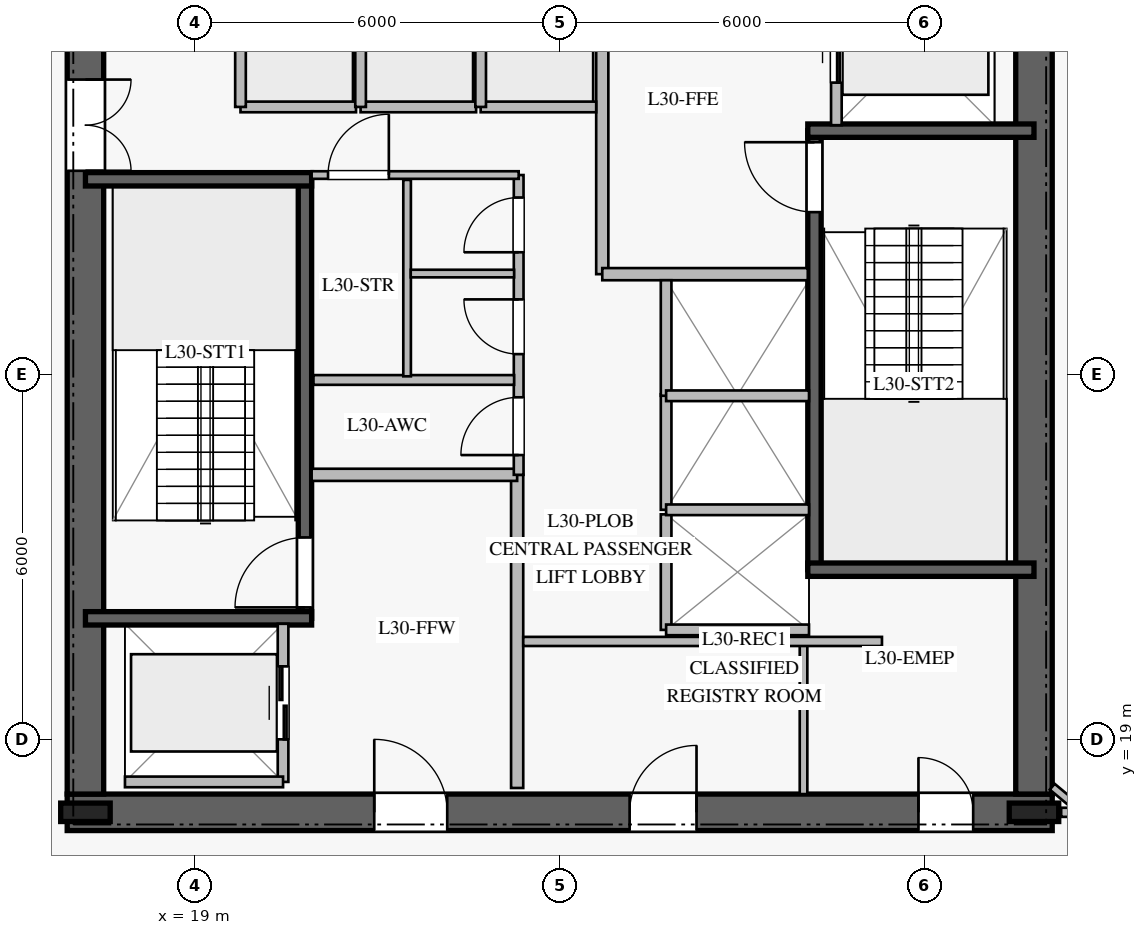
"""IFC4 building model, lengths in metres.
Left out: names, types, materials, properties, quantities, classifications, styles, units other than length and angle.
Written with IfcOpenShell. Run it as: python <this file> out.ifc"""

import sys

from ifc_helpers import new_model, si_unit, direction, frame, frame_2d, origin, origin_2d, place, context, subcontext, project, spatial, rectangle, i_section, extrude, element, fill, save


model = new_model("IFC4")
c1 = context("Model", 3, precision=1e-05, world=origin(), true_north=direction((0.0, 1.0)))
c2 = subcontext(c1, "Body", "Model", "MODEL_VIEW")
j1 = project(units=[si_unit("LENGTHUNIT", "METRE"), si_unit("PLANEANGLEUNIT", "RADIAN")], contexts=[c1])
p1 = place(None, origin())
s1 = spatial("IfcSite", under=j1, at=p1, CompositionType="ELEMENT")
p2 = place(p1, origin())
s2 = spatial("IfcBuilding", under=s1, at=p2, CompositionType="ELEMENT")
p3 = place(p2, frame((0.0, 0.0, 126.4)))
s3 = spatial("IfcBuildingStorey", under=s2, at=p3, CompositionType="ELEMENT", Elevation=126.4)
p4 = place(p3, frame((16.9, 17.8, 0.0), z_axis=(0.0, 0.0, 1.0), x_axis=(1.0, 0.0, 0.0)))
e1 = element("IfcWall", 1, at=p4, inside=s3, PredefinedType="SHEAR", context=c2, shape_type="SweptSolid", body=[
    extrude(rectangle(XDim=16.2, YDim=0.6, at=frame_2d((8.1, 0.0))), origin(), (0.0, 0.0, 1.0), 3.76),
])
p5 = place(p4, frame((5.05, 0.0, 0.0)))
e2 = element("IfcOpeningElement", 2, at=p5, cuts=e1, PredefinedType="OPENING", context=c2, shape_type="SweptSolid", body=[
    extrude(rectangle(XDim=1.2, YDim=2.25, at=frame_2d((0.6, 1.125))), frame((0.0, 0.31, 0.0), z_axis=(0.0, -1.0, 0.0), x_axis=(1.0, 0.0, 0.0)), (0.0, 0.0, 1.0), 0.62),
])
p6 = place(p4, frame((14.0, 0.0, 0.0)))
e3 = element("IfcOpeningElement", 3, at=p6, cuts=e1, PredefinedType="OPENING", context=c2, shape_type="SweptSolid", body=[
    extrude(rectangle(XDim=0.9, YDim=2.1, at=frame_2d((0.45, 1.05))), frame((0.0, 0.31, 0.0), z_axis=(0.0, -1.0, 0.0), x_axis=(1.0, 0.0, 0.0)), (0.0, 0.0, 1.0), 0.62),
])
p7 = place(p4, frame((9.25, 0.0, 0.0)))
e4 = element("IfcOpeningElement", 4, at=p7, cuts=e1, PredefinedType="OPENING", context=c2, shape_type="SweptSolid", body=[
    extrude(rectangle(XDim=1.1, YDim=2.2, at=frame_2d((0.55, 1.1))), frame((0.0, 0.31, 0.0), z_axis=(0.0, -1.0, 0.0), x_axis=(1.0, 0.0, 0.0)), (0.0, 0.0, 1.0), 0.62),
])
p8 = place(p3, frame((17.2, 31.9, 0.0), z_axis=(0.0, 0.0, 1.0), x_axis=(0.0, -1.0, 0.0)))
e5 = element("IfcWall", 5, at=p8, inside=s3, PredefinedType="SHEAR", context=c2, shape_type="SweptSolid", body=[
    extrude(rectangle(XDim=13.8, YDim=0.6, at=frame_2d((6.9, 0.0))), origin(), (0.0, 0.0, 1.0), 3.76),
])
p9 = place(p8, frame((2.05, 0.0, 0.0)))
e6 = element("IfcOpeningElement", 6, at=p9, cuts=e5, PredefinedType="OPENING", context=c2, shape_type="SweptSolid", body=[
    extrude(rectangle(XDim=1.5, YDim=2.2, at=frame_2d((0.75, 1.1))), frame((0.0, 0.31, 0.0), z_axis=(0.0, -1.0, 0.0), x_axis=(1.0, 0.0, 0.0)), (0.0, 0.0, 1.0), 0.62),
])
p10 = place(p3, frame((32.8, 18.1, 0.0), z_axis=(0.0, 0.0, 1.0), x_axis=(0.0, 1.0, 0.0)))
e7 = element("IfcWall", 7, at=p10, inside=s3, PredefinedType="SHEAR", context=c2, shape_type="SweptSolid", body=[
    extrude(rectangle(XDim=13.8, YDim=0.6, at=frame_2d((6.9, 0.0))), origin(), (0.0, 0.0, 1.0), 3.76),
])
for number, where, z_axis, x_axis in (
    (8, (17.2, 17.8, 0.0), (0.0, 0.0, 1.0), (1.0, 0.0, 0.0)),
    (9, (32.8, 17.8, 0.0), (0.0, 0.0, 1.0), (1.0, 0.0, 0.0)),
):
    element("IfcColumn", number, at=place(p3, frame(where, z_axis=z_axis, x_axis=x_axis)), inside=s3, PredefinedType="COLUMN", context=c2, shape_type="SweptSolid", body=[
        extrude(i_section(OverallWidth=0.303, OverallDepth=0.814, WebThickness=0.021, FlangeThickness=0.04, at=origin_2d()), origin(), (0.0, 0.0, 1.0), 4.0),
    ])
p11 = place(p3, frame((20.81, 20.99, 0.0), z_axis=(0.0, 0.0, 1.0), x_axis=(0.0, 1.0, 0.0)))
e10 = element("IfcWall", 10, at=p11, inside=s3, PredefinedType="SOLIDWALL", context=c2, shape_type="SweptSolid", body=[
    extrude(rectangle(XDim=7.22, YDim=0.22, at=frame_2d((3.61, 0.0))), origin(), (0.0, 0.0, 1.0), 3.76),
])
p12 = place(p11, frame((0.18, 0.0, 0.0)))
e11 = element("IfcOpeningElement", 11, at=p12, cuts=e10, PredefinedType="OPENING", context=c2, shape_type="SweptSolid", body=[
    extrude(rectangle(XDim=1.15, YDim=2.2, at=frame_2d((0.575, 1.1))), frame((0.0, 0.12, 0.0), z_axis=(0.0, -1.0, 0.0), x_axis=(1.0, 0.0, 0.0)), (0.0, 0.0, 1.0), 0.24),
])
for number, where, z_axis, x_axis in (
    (12, (17.2, 20.99, 0.0), (0.0, 0.0, 1.0), (1.0, 0.0, 0.0)),
    (13, (17.2, 28.21, 0.0), (0.0, 0.0, 1.0), (1.0, 0.0, 0.0)),
):
    element("IfcWall", number, at=place(p3, frame(where, z_axis=z_axis, x_axis=x_axis)), inside=s3, PredefinedType="SOLIDWALL", context=c2, shape_type="SweptSolid", body=[
        extrude(rectangle(XDim=3.72, YDim=0.22, at=frame_2d((1.86, 0.0))), origin(), (0.0, 0.0, 1.0), 3.76),
    ])
p13 = place(p3, frame((29.19, 21.79, 0.0), z_axis=(0.0, 0.0, 1.0), x_axis=(0.0, 1.0, 0.0)))
e14 = element("IfcWall", 14, at=p13, inside=s3, PredefinedType="SOLIDWALL", context=c2, shape_type="SweptSolid", body=[
    extrude(rectangle(XDim=7.22, YDim=0.22, at=frame_2d((3.61, 0.0))), origin(), (0.0, 0.0, 1.0), 3.76),
])
p14 = place(p13, frame((5.88, 0.0, 0.0)))
e15 = element("IfcOpeningElement", 15, at=p14, cuts=e14, PredefinedType="OPENING", context=c2, shape_type="SweptSolid", body=[
    extrude(rectangle(XDim=1.15, YDim=2.2, at=frame_2d((0.575, 1.1))), frame((0.0, 0.12, 0.0), z_axis=(0.0, -1.0, 0.0), x_axis=(1.0, 0.0, 0.0)), (0.0, 0.0, 1.0), 0.24),
])
for number, where, z_axis, x_axis in (
    (16, (29.08, 21.79, 0.0), (0.0, 0.0, 1.0), (1.0, 0.0, 0.0)),
    (17, (29.08, 29.01, 0.0), (0.0, 0.0, 1.0), (1.0, 0.0, 0.0)),
):
    element("IfcWall", number, at=place(p3, frame(where, z_axis=z_axis, x_axis=x_axis)), inside=s3, PredefinedType="SOLIDWALL", context=c2, shape_type="SweptSolid", body=[
        extrude(rectangle(XDim=3.72, YDim=0.22, at=frame_2d((1.86, 0.0))), origin(), (0.0, 0.0, 1.0), 3.76),
    ])
p15 = place(p3, frame((24.3, 18.2, 0.0), z_axis=(0.0, 0.0, 1.0), x_axis=(0.0, 1.0, 0.0)))
e18 = element("IfcWall", 18, at=p15, inside=s3, PredefinedType="PARTITIONING", context=c2, shape_type="SweptSolid", body=[
    extrude(rectangle(XDim=5.15, YDim=0.2, at=frame_2d((2.575, 0.0))), origin(), (0.0, 0.0, 1.0), 3.76),
])
p16 = place(p3, frame((20.92, 23.35, 0.0), z_axis=(0.0, 0.0, 1.0), x_axis=(1.0, 0.0, 0.0)))
e19 = element("IfcWall", 19, at=p16, inside=s3, PredefinedType="PARTITIONING", context=c2, shape_type="SweptSolid", body=[
    extrude(rectangle(XDim=3.38, YDim=0.2, at=frame_2d((1.69, 0.0))), origin(), (0.0, 0.0, 1.0), 3.76),
])
p17 = place(p3, frame((25.7, 26.65, 0.0), z_axis=(0.0, 0.0, 1.0), x_axis=(0.0, 1.0, 0.0)))
e20 = element("IfcWall", 20, at=p17, inside=s3, PredefinedType="PARTITIONING", context=c2, shape_type="SweptSolid", body=[
    extrude(rectangle(XDim=5.15, YDim=0.2, at=frame_2d((2.575, 0.0))), origin(), (0.0, 0.0, 1.0), 3.76),
])
p18 = place(p3, frame((25.7, 26.65, 0.0), z_axis=(0.0, 0.0, 1.0), x_axis=(1.0, 0.0, 0.0)))
e21 = element("IfcWall", 21, at=p18, inside=s3, PredefinedType="PARTITIONING", context=c2, shape_type="SweptSolid", body=[
    extrude(rectangle(XDim=3.38, YDim=0.2, at=frame_2d((1.69, 0.0))), origin(), (0.0, 0.0, 1.0), 3.76),
])
p19 = place(p3, frame((24.325, 23.35, 0.0), z_axis=(0.0, 0.0, 1.0), x_axis=(0.0, 1.0, 0.0)))
e22 = element("IfcWall", 22, at=p19, inside=s3, PredefinedType="PLUMBINGWALL", context=c2, shape_type="SweptSolid", body=[
    extrude(rectangle(XDim=4.93, YDim=0.16, at=frame_2d((2.465, 0.0))), origin(), (0.0, 0.0, 1.0), 3.76),
])
p20 = place(p19, frame((0.325, 0.0, 0.0)))
e23 = element("IfcOpeningElement", 23, at=p20, cuts=e22, PredefinedType="OPENING", context=c2, shape_type="SweptSolid", body=[
    extrude(rectangle(XDim=0.95, YDim=2.1, at=frame_2d((0.475, 1.05))), frame((0.0, 0.09, 0.0), z_axis=(0.0, -1.0, 0.0), x_axis=(1.0, 0.0, 0.0)), (0.0, 0.0, 1.0), 0.18),
])
p21 = place(p19, frame((1.985, 0.0, 0.0)))
e24 = element("IfcOpeningElement", 24, at=p21, cuts=e22, PredefinedType="OPENING", context=c2, shape_type="SweptSolid", body=[
    extrude(rectangle(XDim=0.9, YDim=2.1, at=frame_2d((0.45, 1.05))), frame((0.0, 0.09, 0.0), z_axis=(0.0, -1.0, 0.0), x_axis=(1.0, 0.0, 0.0)), (0.0, 0.0, 1.0), 0.18),
])
p22 = place(p19, frame((3.66, 0.0, 0.0)))
e25 = element("IfcOpeningElement", 25, at=p22, cuts=e22, PredefinedType="OPENING", context=c2, shape_type="SweptSolid", body=[
    extrude(rectangle(XDim=0.9, YDim=2.1, at=frame_2d((0.45, 1.05))), frame((0.0, 0.09, 0.0), z_axis=(0.0, -1.0, 0.0), x_axis=(1.0, 0.0, 0.0)), (0.0, 0.0, 1.0), 0.18),
])
p23 = place(p3, frame((20.92, 28.28, 0.0), z_axis=(0.0, 0.0, 1.0), x_axis=(1.0, 0.0, 0.0)))
e26 = element("IfcWall", 26, at=p23, inside=s3, PredefinedType="PARTITIONING", context=c2, shape_type="SweptSolid", body=[
    extrude(rectangle(XDim=3.405, YDim=0.125, at=frame_2d((1.703, 0.0))), origin(), (0.0, 0.0, 1.0), 3.76),
])
p24 = place(p23, frame((0.27, 0.0, 0.0)))
e27 = element("IfcOpeningElement", 27, at=p24, cuts=e26, PredefinedType="OPENING", context=c2, shape_type="SweptSolid", body=[
    extrude(rectangle(XDim=1.0, YDim=2.15, at=frame_2d((0.5, 1.075))), frame((0.0, 0.073, 0.0), z_axis=(0.0, -1.0, 0.0), x_axis=(1.0, 0.0, 0.0)), (0.0, 0.0, 1.0), 0.145),
])
p25 = place(p3, frame((29.01, 18.1, 0.0), z_axis=(0.0, 0.0, 1.0), x_axis=(0.0, 1.0, 0.0)))
e28 = element("IfcWall", 28, at=p25, inside=s3, PredefinedType="PARTITIONING", context=c2, shape_type="SweptSolid", body=[
    extrude(rectangle(XDim=2.45, YDim=0.125, at=frame_2d((1.225, 0.0))), origin(), (0.0, 0.0, 1.0), 3.76),
])
p26 = place(p3, frame((20.95, 24.91, 0.0), z_axis=(0.0, 0.0, 1.0), x_axis=(1.0, 0.0, 0.0)))
e29 = element("IfcWall", 29, at=p26, inside=s3, PredefinedType="PLUMBINGWALL", context=c2, shape_type="SweptSolid", body=[
    extrude(rectangle(XDim=3.3, YDim=0.16, at=frame_2d((1.65, 0.0))), origin(), (0.0, 0.0, 1.0), 3.76),
])
p27 = place(p3, frame((22.49, 24.97, 0.0), z_axis=(0.0, 0.0, 1.0), x_axis=(0.0, 1.0, 0.0)))
e30 = element("IfcWall", 30, at=p27, inside=s3, PredefinedType="PARTITIONING", context=c2, shape_type="SweptSolid", body=[
    extrude(rectangle(XDim=3.23, YDim=0.125, at=frame_2d((1.615, 0.0))), origin(), (0.0, 0.0, 1.0), 3.76),
])
p28 = place(p3, frame((22.55, 26.66, 0.0), z_axis=(0.0, 0.0, 1.0), x_axis=(1.0, 0.0, 0.0)))
e31 = element("IfcWall", 31, at=p28, inside=s3, PredefinedType="PARTITIONING", context=c2, shape_type="SweptSolid", body=[
    extrude(rectangle(XDim=1.7, YDim=0.125, at=frame_2d((0.85, 0.0))), origin(), (0.0, 0.0, 1.0), 3.76),
])
p29 = place(p3, frame((24.4, 20.61, 0.0), z_axis=(0.0, 0.0, 1.0), x_axis=(1.0, 0.0, 0.0)))
e32 = element("IfcWall", 32, at=p29, inside=s3, PredefinedType="PARTITIONING", context=c2, shape_type="SweptSolid", body=[
    extrude(rectangle(XDim=5.9, YDim=0.15, at=frame_2d((2.95, 0.0))), origin(), (0.0, 0.0, 1.0), 3.76),
])
p30 = place(p3, frame((19.75, 29.4, 0.0), z_axis=(0.0, 0.0, 1.0), x_axis=(1.0, 0.0, 0.0)))
e33 = element("IfcWall", 33, at=p30, inside=s3, PredefinedType="PARTITIONING", context=c2, shape_type="SweptSolid", body=[
    extrude(rectangle(XDim=1.9, YDim=0.175, at=frame_2d((0.95, 0.0))), origin(), (0.0, 0.0, 1.0), 3.76),
])
p31 = place(p3, frame((19.75, 29.4, 0.0), z_axis=(0.0, 0.0, 1.0), x_axis=(0.0, 1.0, 0.0)))
e34 = element("IfcWall", 34, at=p31, inside=s3, PredefinedType="PARTITIONING", context=c2, shape_type="SweptSolid", body=[
    extrude(rectangle(XDim=2.35, YDim=0.175, at=frame_2d((1.175, 0.0))), origin(), (0.0, 0.0, 1.0), 3.76),
])
p32 = place(p3, frame((21.725, 29.4, 0.0), z_axis=(0.0, 0.0, 1.0), x_axis=(1.0, 0.0, 0.0)))
e35 = element("IfcWall", 35, at=p32, inside=s3, PredefinedType="PARTITIONING", context=c2, shape_type="SweptSolid", body=[
    extrude(rectangle(XDim=1.9, YDim=0.175, at=frame_2d((0.95, 0.0))), origin(), (0.0, 0.0, 1.0), 3.76),
])
p33 = place(p3, frame((21.725, 29.4, 0.0), z_axis=(0.0, 0.0, 1.0), x_axis=(0.0, 1.0, 0.0)))
e36 = element("IfcWall", 36, at=p33, inside=s3, PredefinedType="PARTITIONING", context=c2, shape_type="SweptSolid", body=[
    extrude(rectangle(XDim=2.35, YDim=0.175, at=frame_2d((1.175, 0.0))), origin(), (0.0, 0.0, 1.0), 3.76),
])
p34 = place(p3, frame((23.7, 29.4, 0.0), z_axis=(0.0, 0.0, 1.0), x_axis=(1.0, 0.0, 0.0)))
e37 = element("IfcWall", 37, at=p34, inside=s3, PredefinedType="PARTITIONING", context=c2, shape_type="SweptSolid", body=[
    extrude(rectangle(XDim=1.9, YDim=0.175, at=frame_2d((0.95, 0.0))), origin(), (0.0, 0.0, 1.0), 3.76),
])
p35 = place(p3, frame((23.7, 29.4, 0.0), z_axis=(0.0, 0.0, 1.0), x_axis=(0.0, 1.0, 0.0)))
e38 = element("IfcWall", 38, at=p35, inside=s3, PredefinedType="PARTITIONING", context=c2, shape_type="SweptSolid", body=[
    extrude(rectangle(XDim=2.35, YDim=0.175, at=frame_2d((1.175, 0.0))), origin(), (0.0, 0.0, 1.0), 3.76),
])
p36 = place(p3, frame((26.75, 20.8, 0.0), z_axis=(0.0, 0.0, 1.0), x_axis=(0.0, 1.0, 0.0)))
e39 = element("IfcWall", 39, at=p36, inside=s3, PredefinedType="PARTITIONING", context=c2, shape_type="SweptSolid", body=[
    extrude(rectangle(XDim=1.9, YDim=0.175, at=frame_2d((0.95, 0.0))), origin(), (0.0, 0.0, 1.0), 3.76),
])
p37 = place(p3, frame((26.75, 20.8, 0.0), z_axis=(0.0, 0.0, 1.0), x_axis=(1.0, 0.0, 0.0)))
e40 = element("IfcWall", 40, at=p37, inside=s3, PredefinedType="PARTITIONING", context=c2, shape_type="SweptSolid", body=[
    extrude(rectangle(XDim=2.35, YDim=0.175, at=frame_2d((1.175, 0.0))), origin(), (0.0, 0.0, 1.0), 3.76),
])
p38 = place(p3, frame((26.75, 22.775, 0.0), z_axis=(0.0, 0.0, 1.0), x_axis=(0.0, 1.0, 0.0)))
e41 = element("IfcWall", 41, at=p38, inside=s3, PredefinedType="PARTITIONING", context=c2, shape_type="SweptSolid", body=[
    extrude(rectangle(XDim=1.9, YDim=0.175, at=frame_2d((0.95, 0.0))), origin(), (0.0, 0.0, 1.0), 3.76),
])
p39 = place(p3, frame((26.75, 22.775, 0.0), z_axis=(0.0, 0.0, 1.0), x_axis=(1.0, 0.0, 0.0)))
e42 = element("IfcWall", 42, at=p39, inside=s3, PredefinedType="PARTITIONING", context=c2, shape_type="SweptSolid", body=[
    extrude(rectangle(XDim=2.35, YDim=0.175, at=frame_2d((1.175, 0.0))), origin(), (0.0, 0.0, 1.0), 3.76),
])
p40 = place(p3, frame((26.75, 24.65, 0.0), z_axis=(0.0, 0.0, 1.0), x_axis=(0.0, 1.0, 0.0)))
e43 = element("IfcWall", 43, at=p40, inside=s3, PredefinedType="PARTITIONING", context=c2, shape_type="SweptSolid", body=[
    extrude(rectangle(XDim=1.9, YDim=0.175, at=frame_2d((0.95, 0.0))), origin(), (0.0, 0.0, 1.0), 3.76),
])
p41 = place(p3, frame((26.75, 24.65, 0.0), z_axis=(0.0, 0.0, 1.0), x_axis=(1.0, 0.0, 0.0)))
e44 = element("IfcWall", 44, at=p41, inside=s3, PredefinedType="PARTITIONING", context=c2, shape_type="SweptSolid", body=[
    extrude(rectangle(XDim=2.35, YDim=0.175, at=frame_2d((1.175, 0.0))), origin(), (0.0, 0.0, 1.0), 3.76),
])
p42 = place(p3, frame((20.45, 18.3, 0.0), z_axis=(0.0, 0.0, 1.0), x_axis=(0.0, 1.0, 0.0)))
e45 = element("IfcWall", 45, at=p42, inside=s3, PredefinedType="PARTITIONING", context=c2, shape_type="SweptSolid", body=[
    extrude(rectangle(XDim=2.6, YDim=0.175, at=frame_2d((1.3, 0.0))), origin(), (0.0, 0.0, 1.0), 3.76),
])
p43 = place(p42, frame((0.7, 0.0, 0.0)))
e46 = element("IfcOpeningElement", 46, at=p43, cuts=e45, PredefinedType="OPENING", context=c2, shape_type="SweptSolid", body=[
    extrude(rectangle(XDim=1.2, YDim=2.2, at=frame_2d((0.6, 1.1))), frame((0.0, 0.098, 0.0), z_axis=(0.0, -1.0, 0.0), x_axis=(1.0, 0.0, 0.0)), (0.0, 0.0, 1.0), 0.195),
])
p44 = place(p3, frame((17.85, 18.3, 0.0), z_axis=(0.0, 0.0, 1.0), x_axis=(1.0, 0.0, 0.0)))
e47 = element("IfcWall", 47, at=p44, inside=s3, PredefinedType="PARTITIONING", context=c2, shape_type="SweptSolid", body=[
    extrude(rectangle(XDim=2.6, YDim=0.175, at=frame_2d((1.3, 0.0))), origin(), (0.0, 0.0, 1.0), 3.76),
])
p45 = place(p3, frame((29.55, 29.1, 0.0), z_axis=(0.0, 0.0, 1.0), x_axis=(0.0, 1.0, 0.0)))
e48 = element("IfcWall", 48, at=p45, inside=s3, PredefinedType="PARTITIONING", context=c2, shape_type="SweptSolid", body=[
    extrude(rectangle(XDim=2.6, YDim=0.175, at=frame_2d((1.3, 0.0))), origin(), (0.0, 0.0, 1.0), 3.76),
])
p46 = place(p45, frame((0.7, 0.0, 0.0)))
e49 = element("IfcOpeningElement", 49, at=p46, cuts=e48, PredefinedType="OPENING", context=c2, shape_type="SweptSolid", body=[
    extrude(rectangle(XDim=1.2, YDim=2.2, at=frame_2d((0.6, 1.1))), frame((0.0, 0.098, 0.0), z_axis=(0.0, -1.0, 0.0), x_axis=(1.0, 0.0, 0.0)), (0.0, 0.0, 1.0), 0.195),
])
p47 = place(p3, frame((33.247, 17.8, 0.0), z_axis=(0.0, 0.0, 1.0), x_axis=(1.0, 0.0, 0.0)))
e50 = element("IfcWall", 50, at=p47, inside=s3, PredefinedType="PARTITIONING", context=c2, shape_type="SweptSolid", body=[
    extrude(rectangle(XDim=7.953, YDim=0.15, at=frame_2d((3.977, 0.0))), origin(), (0.0, 0.0, 1.0), 3.21),
])
p48 = place(p3, frame((33.1, 18.221, 0.0), z_axis=(0.0, 0.0, 1.0), x_axis=(0.76748927859, -0.641061781148, 0.0)))
e51 = element("IfcWall", 51, at=p48, inside=s3, PredefinedType="PARTITIONING", context=c2, shape_type="SweptSolid", body=[
    extrude(rectangle(XDim=0.656, YDim=0.125, at=frame_2d((0.328, 0.0))), origin(), (0.0, 0.0, 1.0), 3.21),
])
p49 = place(p12, origin())
e52 = element("IfcDoor", 52, at=p49, inside=s3, OperationType="SINGLE_SWING_LEFT", PredefinedType="DOOR", context=c2, shape_type="SweptSolid", body=[
    extrude(rectangle(XDim=1.15, YDim=2.2, at=frame_2d((0.575, 1.1))), frame((0.0, 0.025, 0.0), z_axis=(0.0, -1.0, 0.0), x_axis=(1.0, 0.0, 0.0)), (0.0, 0.0, 1.0), 0.05),
])
fill(e11, e52)
p50 = place(p14, origin())
e53 = element("IfcDoor", 53, at=p50, inside=s3, OperationType="SINGLE_SWING_RIGHT", PredefinedType="DOOR", context=c2, shape_type="SweptSolid", body=[
    extrude(rectangle(XDim=1.15, YDim=2.2, at=frame_2d((0.575, 1.1))), frame((0.0, 0.025, 0.0), z_axis=(0.0, -1.0, 0.0), x_axis=(1.0, 0.0, 0.0)), (0.0, 0.0, 1.0), 0.05),
])
fill(e15, e53)
p51 = place(p5, origin())
e54 = element("IfcDoor", 54, at=p51, inside=s3, OperationType="SINGLE_SWING_LEFT", PredefinedType="DOOR", context=c2, shape_type="SweptSolid", body=[
    extrude(rectangle(XDim=1.2, YDim=2.25, at=frame_2d((0.6, 1.125))), frame((0.0, 0.025, 0.0), z_axis=(0.0, -1.0, 0.0), x_axis=(1.0, 0.0, 0.0)), (0.0, 0.0, 1.0), 0.05),
])
fill(e2, e54)
p52 = place(p9, origin())
e55 = element("IfcDoor", 55, at=p52, inside=s3, OperationType="DOUBLE_DOOR_SINGLE_SWING", PredefinedType="DOOR", context=c2, shape_type="SweptSolid", body=[
    extrude(rectangle(XDim=1.5, YDim=2.2, at=frame_2d((0.75, 1.1))), frame((0.0, 0.025, 0.0), z_axis=(0.0, -1.0, 0.0), x_axis=(1.0, 0.0, 0.0)), (0.0, 0.0, 1.0), 0.05),
])
fill(e6, e55)
p53 = place(p20, origin())
e56 = element("IfcDoor", 56, at=p53, inside=s3, OperationType="SINGLE_SWING_LEFT", PredefinedType="DOOR", context=c2, shape_type="SweptSolid", body=[
    extrude(rectangle(XDim=0.95, YDim=2.1, at=frame_2d((0.475, 1.05))), frame((0.0, 0.025, 0.0), z_axis=(0.0, -1.0, 0.0), x_axis=(1.0, 0.0, 0.0)), (0.0, 0.0, 1.0), 0.05),
])
fill(e23, e56)
p54 = place(p21, origin())
e57 = element("IfcDoor", 57, at=p54, inside=s3, OperationType="SINGLE_SWING_RIGHT", PredefinedType="DOOR", context=c2, shape_type="SweptSolid", body=[
    extrude(rectangle(XDim=0.9, YDim=2.1, at=frame_2d((0.45, 1.05))), frame((0.0, 0.025, 0.0), z_axis=(0.0, -1.0, 0.0), x_axis=(1.0, 0.0, 0.0)), (0.0, 0.0, 1.0), 0.05),
])
fill(e24, e57)
p55 = place(p22, origin())
e58 = element("IfcDoor", 58, at=p55, inside=s3, OperationType="SINGLE_SWING_LEFT", PredefinedType="DOOR", context=c2, shape_type="SweptSolid", body=[
    extrude(rectangle(XDim=0.9, YDim=2.1, at=frame_2d((0.45, 1.05))), frame((0.0, 0.025, 0.0), z_axis=(0.0, -1.0, 0.0), x_axis=(1.0, 0.0, 0.0)), (0.0, 0.0, 1.0), 0.05),
])
fill(e25, e58)
p56 = place(p24, origin())
e59 = element("IfcDoor", 59, at=p56, inside=s3, OperationType="SINGLE_SWING_RIGHT", PredefinedType="DOOR", context=c2, shape_type="SweptSolid", body=[
    extrude(rectangle(XDim=1.0, YDim=2.15, at=frame_2d((0.5, 1.075))), frame((0.0, 0.025, 0.0), z_axis=(0.0, -1.0, 0.0), x_axis=(1.0, 0.0, 0.0)), (0.0, 0.0, 1.0), 0.05),
])
fill(e27, e59)
p57 = place(p6, origin())
e60 = element("IfcDoor", 60, at=p57, inside=s3, OperationType="SINGLE_SWING_LEFT", PredefinedType="DOOR", context=c2, shape_type="SweptSolid", body=[
    extrude(rectangle(XDim=0.9, YDim=2.1, at=frame_2d((0.45, 1.05))), frame((0.0, 0.025, 0.0), z_axis=(0.0, -1.0, 0.0), x_axis=(1.0, 0.0, 0.0)), (0.0, 0.0, 1.0), 0.05),
])
fill(e3, e60)
p58 = place(p7, origin())
e61 = element("IfcDoor", 61, at=p58, inside=s3, OperationType="SINGLE_SWING_RIGHT", PredefinedType="DOOR", context=c2, shape_type="SweptSolid", body=[
    extrude(rectangle(XDim=1.1, YDim=2.2, at=frame_2d((0.55, 1.1))), frame((0.0, 0.025, 0.0), z_axis=(0.0, -1.0, 0.0), x_axis=(1.0, 0.0, 0.0)), (0.0, 0.0, 1.0), 0.05),
])
fill(e4, e61)
p59 = place(p43, origin())
e62 = element("IfcDoor", 62, at=p59, inside=s3, OperationType="DOUBLE_DOOR_SLIDING", PredefinedType="DOOR", context=c2, shape_type="SweptSolid", body=[
    extrude(rectangle(XDim=1.2, YDim=2.2, at=frame_2d((0.6, 1.1))), frame((0.0, 0.025, 0.0), z_axis=(0.0, -1.0, 0.0), x_axis=(1.0, 0.0, 0.0)), (0.0, 0.0, 1.0), 0.05),
])
fill(e46, e62)
p60 = place(p46, origin())
e63 = element("IfcDoor", 63, at=p60, inside=s3, OperationType="DOUBLE_DOOR_SLIDING", PredefinedType="DOOR", context=c2, shape_type="SweptSolid", body=[
    extrude(rectangle(XDim=1.2, YDim=2.2, at=frame_2d((0.6, 1.1))), frame((0.0, 0.025, 0.0), z_axis=(0.0, -1.0, 0.0), x_axis=(1.0, 0.0, 0.0)), (0.0, 0.0, 1.0), 0.05),
])
fill(e49, e63)
save(model, sys.argv[1])
